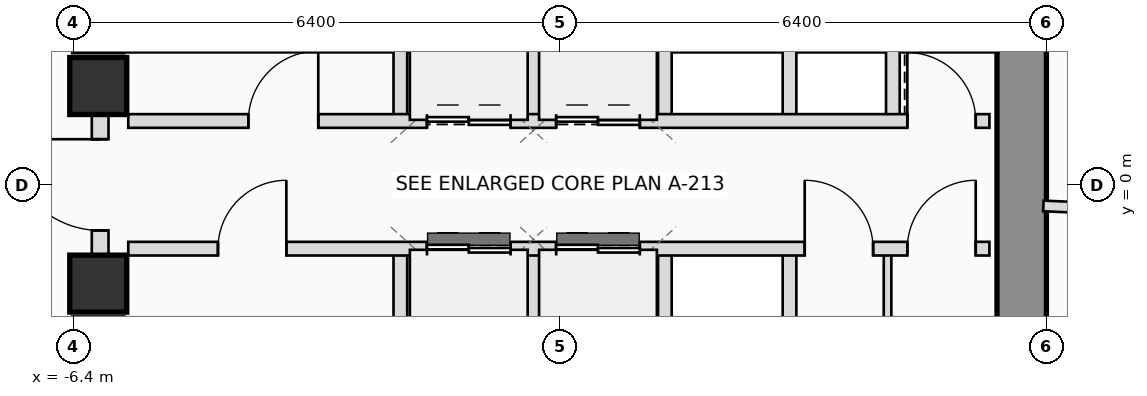
"""IFC4 building model, lengths in metres.
Left out: names, types, materials, properties, quantities, classifications, styles, units other than length and angle.
Written with IfcOpenShell. Run it as: python <this file> out.ifc"""

import sys

from ifc_helpers import new_model, si_unit, direction, frame, frame_2d, origin, origin_2d, place, context, subcontext, project, spatial, rectangle, extrude, source, transform, mapped, element, fill, save


model = new_model("IFC4")
c1 = context("Model", 3, precision=1e-05, world=origin(), true_north=direction((0.0, 1.0)))
c2 = subcontext(c1, "Body", "Model", "MODEL_VIEW")
j1 = project(units=[si_unit("LENGTHUNIT", "METRE"), si_unit("PLANEANGLEUNIT", "RADIAN")], contexts=[c1])
p1 = place(None, origin())
s1 = spatial("IfcSite", under=j1, at=p1, CompositionType="ELEMENT")
p2 = place(p1, origin())
s2 = spatial("IfcBuilding", under=s1, at=p2, CompositionType="ELEMENT")
p3 = place(p2, frame((0.0, 0.0, 129.5)))
s3 = spatial("IfcBuildingStorey", under=s2, at=p3, CompositionType="ELEMENT", Elevation=129.5)
p4 = place(p3, frame((6.075, -5.2, 0.0), z_axis=(0.0, 0.0, 1.0), x_axis=(0.0, 1.0, 0.0)))
e1 = element("IfcWall", 1, at=p4, inside=s3, PredefinedType="SHEAR", context=c2, shape_type="SweptSolid", body=[
    extrude(rectangle(XDim=10.4, YDim=0.65, at=frame_2d((5.2, 0.0))), origin(), (0.0, 0.0, 1.0), 3.45),
])
m1 = source(origin(), c2, "Body", "SweptSolid", [
    extrude(rectangle(XDim=0.75, YDim=0.75, at=origin_2d()), origin(), (0.0, 0.0, 1.0), 3.45),
])
for number, where, z_axis, x_axis in (
    (2, (-6.075, -1.3, 0.0), (0.0, 0.0, 1.0), (1.0, 0.0, 0.0)),
    (3, (-6.075, 1.3, 0.0), (0.0, 0.0, 1.0), (1.0, 0.0, 0.0)),
):
    element("IfcColumn", number, at=place(p3, frame(where, z_axis=z_axis, x_axis=x_axis)), inside=s3, PredefinedType="COLUMN", context=c2, shape_type="MappedRepresentation", body=[
        mapped(m1, transform((0.0, 0.0, 0.0), scale=1.0)),
    ])
p5 = place(p3, frame((-6.05, -0.95, 0.0), z_axis=(0.0, 0.0, 1.0), x_axis=(0.0, 1.0, 0.0)))
e4 = element("IfcWall", 4, at=p5, inside=s3, PredefinedType="PLUMBINGWALL", context=c2, shape_type="SweptSolid", body=[
    extrude(rectangle(XDim=1.9, YDim=0.22, at=frame_2d((0.95, 0.0))), origin(), (0.0, 0.0, 1.0), 2.23),
])
p6 = place(p5, frame((0.35, 0.0, 0.0)))
e5 = element("IfcOpeningElement", 5, at=p6, cuts=e4, PredefinedType="OPENING", context=c2, shape_type="SweptSolid", body=[
    extrude(rectangle(XDim=1.2, YDim=2.2, at=frame_2d((0.6, 1.1))), frame((0.0, 0.12, 0.0), z_axis=(0.0, -1.0, 0.0), x_axis=(1.0, 0.0, 0.0)), (0.0, 0.0, 1.0), 0.24),
])
for number, where, z_axis, x_axis in (
    (6, (-2.1, 0.84, 0.0), (0.0, 0.0, 1.0), (0.0, 1.0, 0.0)),
    (7, (-2.1, -1.82, 0.0), (0.0, 0.0, 1.0), (0.0, 1.0, 0.0)),
    (8, (-0.35, 0.84, 0.0), (0.0, 0.0, 1.0), (0.0, 1.0, 0.0)),
    (9, (-0.35, -1.82, 0.0), (0.0, 0.0, 1.0), (0.0, 1.0, 0.0)),
    (10, (1.38, 0.84, 0.0), (0.0, 0.0, 1.0), (0.0, 1.0, 0.0)),
    (11, (1.38, -1.82, 0.0), (0.0, 0.0, 1.0), (0.0, 1.0, 0.0)),
    (12, (3.02, 0.84, 0.0), (0.0, 0.0, 1.0), (0.0, 1.0, 0.0)),
    (13, (4.38, 0.84, 0.0), (0.0, 0.0, 1.0), (0.0, 1.0, 0.0)),
    (14, (3.02, -1.82, 0.0), (0.0, 0.0, 1.0), (0.0, 1.0, 0.0)),
):
    element("IfcWall", number, at=place(p3, frame(where, z_axis=z_axis, x_axis=x_axis)), inside=s3, PredefinedType="PLUMBINGWALL", context=c2, shape_type="SweptSolid", body=[
        extrude(rectangle(XDim=0.98, YDim=0.18, at=frame_2d((0.49, 0.0))), origin(), (0.0, 0.0, 1.0), 3.25),
    ])
p7 = place(p3, frame((4.31, -1.82, 0.0), z_axis=(0.0, 0.0, 1.0), x_axis=(0.0, 1.0, 0.0)))
e15 = element("IfcWall", 15, at=p7, inside=s3, PredefinedType="PARTITIONING", context=c2, shape_type="SweptSolid", body=[
    extrude(rectangle(XDim=0.98, YDim=0.1, at=frame_2d((0.49, 0.0))), origin(), (0.0, 0.0, 1.0), 3.25),
])
p8 = place(p3, frame((-5.68, 0.84, 0.0), z_axis=(0.0, 0.0, 1.0), x_axis=(1.0, 0.0, 0.0)))
e16 = element("IfcWall", 16, at=p8, inside=s3, PredefinedType="PLUMBINGWALL", context=c2, shape_type="SweptSolid", body=[
    extrude(rectangle(XDim=11.33, YDim=0.18, at=frame_2d((5.665, 0.0))), origin(), (0.0, 0.0, 1.0), 3.25),
])
p9 = place(p8, frame((1.58, 0.0, 0.0)))
e17 = element("IfcOpeningElement", 17, at=p9, cuts=e16, PredefinedType="OPENING", context=c2, shape_type="SweptSolid", body=[
    extrude(rectangle(XDim=0.92, YDim=2.1, at=frame_2d((0.46, 1.05))), frame((0.0, 0.1, 0.0), z_axis=(0.0, -1.0, 0.0), x_axis=(1.0, 0.0, 0.0)), (0.0, 0.0, 1.0), 0.2),
])
p10 = place(p8, frame((3.93, 0.0, 0.0)))
e18 = element("IfcOpeningElement", 18, at=p10, cuts=e16, PredefinedType="OPENING", context=c2, shape_type="SweptSolid", body=[
    extrude(rectangle(XDim=1.1, YDim=2.2, at=frame_2d((0.55, 1.1))), frame((0.0, 0.1, 0.0), z_axis=(0.0, -1.0, 0.0), x_axis=(1.0, 0.0, 0.0)), (0.0, 0.0, 1.0), 0.2),
])
p11 = place(p8, frame((5.63, 0.0, 0.0)))
e19 = element("IfcOpeningElement", 19, at=p11, cuts=e16, PredefinedType="OPENING", context=c2, shape_type="SweptSolid", body=[
    extrude(rectangle(XDim=1.1, YDim=2.2, at=frame_2d((0.55, 1.1))), frame((0.0, 0.1, 0.0), z_axis=(0.0, -1.0, 0.0), x_axis=(1.0, 0.0, 0.0)), (0.0, 0.0, 1.0), 0.2),
])
p12 = place(p8, frame((10.25, 0.0, 0.0)))
e20 = element("IfcOpeningElement", 20, at=p12, cuts=e16, PredefinedType="OPENING", context=c2, shape_type="SweptSolid", body=[
    extrude(rectangle(XDim=0.9, YDim=2.05, at=frame_2d((0.45, 1.025))), frame((0.0, 0.1, 0.0), z_axis=(0.0, -1.0, 0.0), x_axis=(1.0, 0.0, 0.0)), (0.0, 0.0, 1.0), 0.2),
])
p13 = place(p3, frame((-5.68, -0.84, 0.0), z_axis=(0.0, 0.0, 1.0), x_axis=(1.0, 0.0, 0.0)))
e21 = element("IfcWall", 21, at=p13, inside=s3, PredefinedType="PLUMBINGWALL", context=c2, shape_type="SweptSolid", body=[
    extrude(rectangle(XDim=11.33, YDim=0.18, at=frame_2d((5.665, 0.0))), origin(), (0.0, 0.0, 1.0), 3.25),
])
p14 = place(p13, frame((1.18, 0.0, 0.0)))
e22 = element("IfcOpeningElement", 22, at=p14, cuts=e21, PredefinedType="OPENING", context=c2, shape_type="SweptSolid", body=[
    extrude(rectangle(XDim=0.9, YDim=2.05, at=frame_2d((0.45, 1.025))), frame((0.0, 0.1, 0.0), z_axis=(0.0, -1.0, 0.0), x_axis=(1.0, 0.0, 0.0)), (0.0, 0.0, 1.0), 0.2),
])
p15 = place(p13, frame((3.93, 0.0, 0.0)))
e23 = element("IfcOpeningElement", 23, at=p15, cuts=e21, PredefinedType="OPENING", context=c2, shape_type="SweptSolid", body=[
    extrude(rectangle(XDim=1.1, YDim=2.2, at=frame_2d((0.55, 1.1))), frame((0.0, 0.1, 0.0), z_axis=(0.0, -1.0, 0.0), x_axis=(1.0, 0.0, 0.0)), (0.0, 0.0, 1.0), 0.2),
])
p16 = place(p13, frame((5.63, 0.0, 0.0)))
e24 = element("IfcOpeningElement", 24, at=p16, cuts=e21, PredefinedType="OPENING", context=c2, shape_type="SweptSolid", body=[
    extrude(rectangle(XDim=1.1, YDim=2.2, at=frame_2d((0.55, 1.1))), frame((0.0, 0.1, 0.0), z_axis=(0.0, -1.0, 0.0), x_axis=(1.0, 0.0, 0.0)), (0.0, 0.0, 1.0), 0.2),
])
p17 = place(p13, frame((8.9, 0.0, 0.0)))
e25 = element("IfcOpeningElement", 25, at=p17, cuts=e21, PredefinedType="OPENING", context=c2, shape_type="SweptSolid", body=[
    extrude(rectangle(XDim=0.9, YDim=2.05, at=frame_2d((0.45, 1.025))), frame((0.0, 0.1, 0.0), z_axis=(0.0, -1.0, 0.0), x_axis=(1.0, 0.0, 0.0)), (0.0, 0.0, 1.0), 0.2),
])
p18 = place(p13, frame((10.25, 0.0, 0.0)))
e26 = element("IfcOpeningElement", 26, at=p18, cuts=e21, PredefinedType="OPENING", context=c2, shape_type="SweptSolid", body=[
    extrude(rectangle(XDim=0.9, YDim=2.05, at=frame_2d((0.45, 1.025))), frame((0.0, 0.1, 0.0), z_axis=(0.0, -1.0, 0.0), x_axis=(1.0, 0.0, 0.0)), (0.0, 0.0, 1.0), 0.2),
])
p19 = place(p3, frame((6.36, -0.278, 0.0), z_axis=(0.0, 0.0, 1.0), x_axis=(0.999047707238, -0.043631166178, 0.0)))
e27 = element("IfcWall", 27, at=p19, inside=s3, PredefinedType="PARTITIONING", context=c2, shape_type="SweptSolid", body=[
    extrude(rectangle(XDim=8.522, YDim=0.14, at=frame_2d((4.261, 0.0))), origin(), (0.0, 0.0, 1.0), 2.605),
])
p20 = place(p6, origin())
e28 = element("IfcDoor", 28, at=p20, inside=s3, OperationType="SINGLE_SWING_RIGHT", PredefinedType="DOOR", context=c2, shape_type="SweptSolid", body=[
    extrude(rectangle(XDim=1.2, YDim=2.2, at=frame_2d((0.6, 1.1))), frame((0.0, 0.025, 0.0), z_axis=(0.0, -1.0, 0.0), x_axis=(1.0, 0.0, 0.0)), (0.0, 0.0, 1.0), 0.05),
])
fill(e5, e28)
p21 = place(p9, origin())
e29 = element("IfcDoor", 29, at=p21, inside=s3, OperationType="SINGLE_SWING_RIGHT", PredefinedType="DOOR", context=c2, shape_type="SweptSolid", body=[
    extrude(rectangle(XDim=0.92, YDim=2.1, at=frame_2d((0.46, 1.05))), frame((0.0, 0.025, 0.0), z_axis=(0.0, -1.0, 0.0), x_axis=(1.0, 0.0, 0.0)), (0.0, 0.0, 1.0), 0.05),
])
fill(e17, e29)
p22 = place(p10, origin())
e30 = element("IfcDoor", 30, at=p22, inside=s3, OperationType="DOUBLE_DOOR_SLIDING", PredefinedType="DOOR", context=c2, shape_type="SweptSolid", body=[
    extrude(rectangle(XDim=1.1, YDim=2.2, at=frame_2d((0.55, 1.1))), frame((0.0, 0.025, 0.0), z_axis=(0.0, -1.0, 0.0), x_axis=(1.0, 0.0, 0.0)), (0.0, 0.0, 1.0), 0.05),
])
fill(e18, e30)
p23 = place(p11, origin())
e31 = element("IfcDoor", 31, at=p23, inside=s3, OperationType="DOUBLE_DOOR_SLIDING", PredefinedType="DOOR", context=c2, shape_type="SweptSolid", body=[
    extrude(rectangle(XDim=1.1, YDim=2.2, at=frame_2d((0.55, 1.1))), frame((0.0, 0.025, 0.0), z_axis=(0.0, -1.0, 0.0), x_axis=(1.0, 0.0, 0.0)), (0.0, 0.0, 1.0), 0.05),
])
fill(e19, e31)
p24 = place(p12, origin())
e32 = element("IfcDoor", 32, at=p24, inside=s3, OperationType="SINGLE_SWING_LEFT", PredefinedType="DOOR", context=c2, shape_type="SweptSolid", body=[
    extrude(rectangle(XDim=0.9, YDim=2.05, at=frame_2d((0.45, 1.025))), frame((0.0, 0.025, 0.0), z_axis=(0.0, -1.0, 0.0), x_axis=(1.0, 0.0, 0.0)), (0.0, 0.0, 1.0), 0.05),
])
fill(e20, e32)
p25 = place(p14, origin())
e33 = element("IfcDoor", 33, at=p25, inside=s3, OperationType="SINGLE_SWING_RIGHT", PredefinedType="DOOR", context=c2, shape_type="SweptSolid", body=[
    extrude(rectangle(XDim=0.9, YDim=2.05, at=frame_2d((0.45, 1.025))), frame((0.0, 0.025, 0.0), z_axis=(0.0, -1.0, 0.0), x_axis=(1.0, 0.0, 0.0)), (0.0, 0.0, 1.0), 0.05),
])
fill(e22, e33)
p26 = place(p15, origin())
e34 = element("IfcDoor", 34, at=p26, inside=s3, OperationType="DOUBLE_DOOR_SLIDING", PredefinedType="DOOR", context=c2, shape_type="SweptSolid", body=[
    extrude(rectangle(XDim=1.1, YDim=2.2, at=frame_2d((0.55, 1.1))), frame((0.0, 0.025, 0.0), z_axis=(0.0, -1.0, 0.0), x_axis=(1.0, 0.0, 0.0)), (0.0, 0.0, 1.0), 0.05),
])
fill(e23, e34)
p27 = place(p16, origin())
e35 = element("IfcDoor", 35, at=p27, inside=s3, OperationType="DOUBLE_DOOR_SLIDING", PredefinedType="DOOR", context=c2, shape_type="SweptSolid", body=[
    extrude(rectangle(XDim=1.1, YDim=2.2, at=frame_2d((0.55, 1.1))), frame((0.0, 0.025, 0.0), z_axis=(0.0, -1.0, 0.0), x_axis=(1.0, 0.0, 0.0)), (0.0, 0.0, 1.0), 0.05),
])
fill(e24, e35)
p28 = place(p17, origin())
e36 = element("IfcDoor", 36, at=p28, inside=s3, OperationType="SINGLE_SWING_LEFT", PredefinedType="DOOR", context=c2, shape_type="SweptSolid", body=[
    extrude(rectangle(XDim=0.9, YDim=2.05, at=frame_2d((0.45, 1.025))), frame((0.0, 0.025, 0.0), z_axis=(0.0, -1.0, 0.0), x_axis=(1.0, 0.0, 0.0)), (0.0, 0.0, 1.0), 0.05),
])
fill(e25, e36)
p29 = place(p18, origin())
e37 = element("IfcDoor", 37, at=p29, inside=s3, OperationType="SINGLE_SWING_RIGHT", PredefinedType="DOOR", context=c2, shape_type="SweptSolid", body=[
    extrude(rectangle(XDim=0.9, YDim=2.05, at=frame_2d((0.45, 1.025))), frame((0.0, 0.025, 0.0), z_axis=(0.0, -1.0, 0.0), x_axis=(1.0, 0.0, 0.0)), (0.0, 0.0, 1.0), 0.05),
])
fill(e26, e37)
save(model, sys.argv[1])
